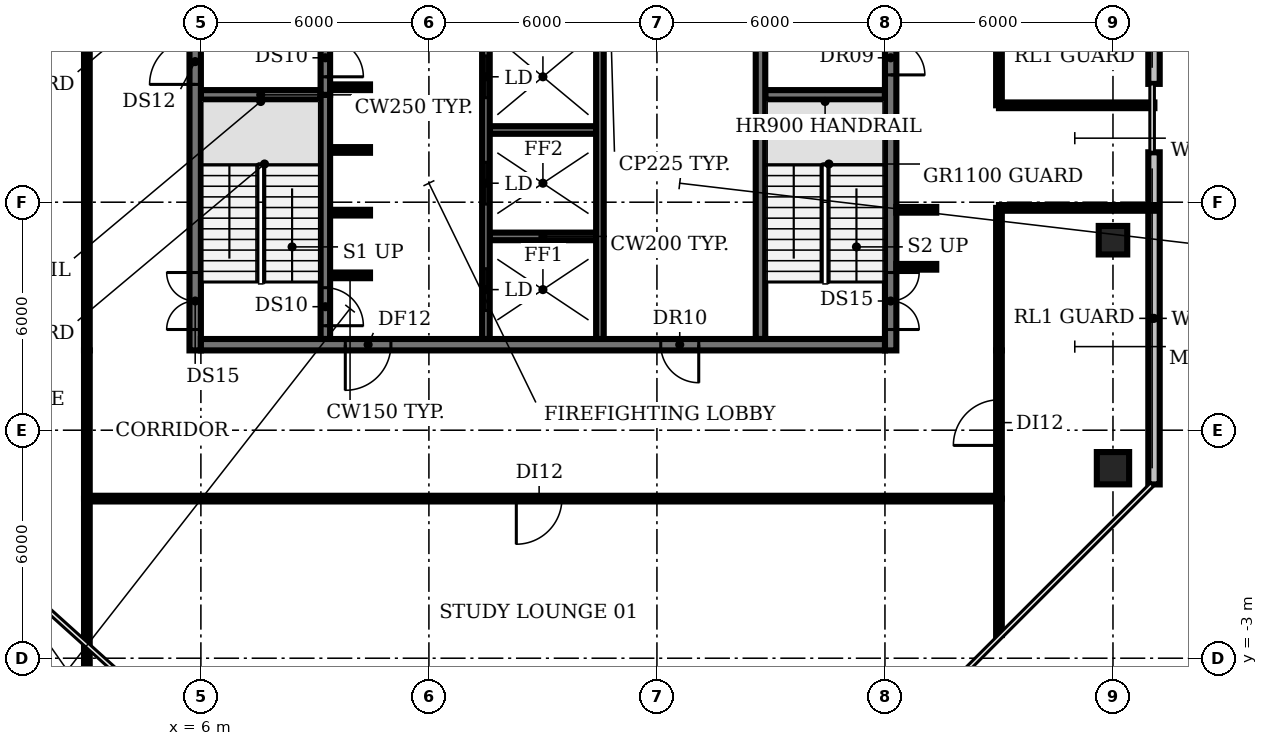
"""IFC4 building model, lengths in metres.
Left out: names, types, materials, properties, quantities, classifications, styles, units other than length and angle.
Written with IfcOpenShell. Run it as: python <this file> out.ifc"""

import sys

from ifc_helpers import new_model, si_unit, direction, frame, frame_2d, origin, origin_2d, place, context, subcontext, project, spatial, rectangle, circle, extrude, element, fill, save


model = new_model("IFC4")
c1 = context("Model", 3, precision=1e-05, world=origin(), true_north=direction((0.0, 1.0)))
c2 = subcontext(c1, "Body", "Model", "MODEL_VIEW")
j1 = project(units=[si_unit("LENGTHUNIT", "METRE"), si_unit("PLANEANGLEUNIT", "RADIAN")], contexts=[c1])
p1 = place(None, origin())
s1 = spatial("IfcSite", under=j1, at=p1, CompositionType="ELEMENT")
p2 = place(p1, origin())
s2 = spatial("IfcBuilding", under=s1, at=p2, CompositionType="ELEMENT")
p3 = place(p2, frame((0.0, 0.0, 268.4)))
s3 = spatial("IfcBuildingStorey", under=s2, at=p3, CompositionType="ELEMENT", Elevation=268.4)
p4 = place(p3, frame((30.0, 2.0, 0.0), z_axis=(0.0, 0.0, 1.0), x_axis=(1.0, 0.0, 0.0)))
e1 = element("IfcColumn", 1, at=p4, inside=s3, PredefinedType="COLUMN", context=c2, shape_type="SweptSolid", body=[
    extrude(circle(Radius=0.425, at=origin_2d()), origin(), (0.0, 0.0, 1.0), 3.8),
])
p5 = place(p3, frame((30.0, 8.0, 0.0), z_axis=(0.0, 0.0, 1.0), x_axis=(1.0, 0.0, 0.0)))
e2 = element("IfcColumn", 2, at=p5, inside=s3, PredefinedType="COLUMN", context=c2, shape_type="SweptSolid", body=[
    extrude(rectangle(XDim=0.75, YDim=0.75, at=origin_2d()), origin(), (0.0, 0.0, 1.0), 3.8),
])
p6 = place(p3, frame((31.08, 1.573, 0.0), z_axis=(0.0, 0.0, 1.0), x_axis=(0.0, 1.0, 0.0)))
e3 = element("IfcWall", 3, at=p6, inside=s3, PredefinedType="SOLIDWALL", context=c2, shape_type="SweptSolid", body=[
    extrude(rectangle(XDim=8.74, YDim=0.3, at=frame_2d((4.37, 0.0))), origin(), (0.0, 0.0, 1.0), 3.8),
])
p7 = place(p3, frame((31.08, 12.113, 0.0), z_axis=(0.0, 0.0, 1.0), x_axis=(0.0, 1.0, 0.0)))
e4 = element("IfcWall", 4, at=p7, inside=s3, PredefinedType="SOLIDWALL", context=c2, shape_type="SweptSolid", body=[
    extrude(rectangle(XDim=2.313, YDim=0.3, at=frame_2d((1.157, 0.0))), origin(), (0.0, 0.0, 1.0), 3.8),
])
p8 = place(p3, frame((9.4, 7.075, 0.0), z_axis=(0.0, 0.0, 1.0), x_axis=(1.0, 0.0, 0.0)))
e5 = element("IfcWall", 5, at=p8, inside=s3, PredefinedType="SHEAR", context=c2, shape_type="SweptSolid", body=[
    extrude(rectangle(XDim=1.05, YDim=0.15, at=frame_2d((0.525, 0.0))), origin(), (0.0, 0.0, 1.0), 3.8),
])
p9 = place(p3, frame((13.6, 8.1, 0.0), z_axis=(0.0, 0.0, 1.0), x_axis=(1.0, 0.0, 0.0)))
e6 = element("IfcWall", 6, at=p9, inside=s3, PredefinedType="SHEAR", context=c2, shape_type="SweptSolid", body=[
    extrude(rectangle(XDim=2.8, YDim=0.2, at=frame_2d((1.4, 0.0))), origin(), (0.0, 0.0, 1.0), 3.8),
])
for number, where, z_axis, x_axis in (
    (7, (9.4, 8.725, 0.0), (0.0, 0.0, 1.0), (1.0, 0.0, 0.0)),
    (8, (9.4, 10.375, 0.0), (0.0, 0.0, 1.0), (1.0, 0.0, 0.0)),
):
    element("IfcWall", number, at=place(p3, frame(where, z_axis=z_axis, x_axis=x_axis)), inside=s3, PredefinedType="SHEAR", context=c2, shape_type="SweptSolid", body=[
        extrude(rectangle(XDim=1.05, YDim=0.15, at=frame_2d((0.525, 0.0))), origin(), (0.0, 0.0, 1.0), 3.8),
    ])
p10 = place(p3, frame((13.6, 10.9, 0.0), z_axis=(0.0, 0.0, 1.0), x_axis=(1.0, 0.0, 0.0)))
e9 = element("IfcWall", 9, at=p10, inside=s3, PredefinedType="SHEAR", context=c2, shape_type="SweptSolid", body=[
    extrude(rectangle(XDim=2.8, YDim=0.2, at=frame_2d((1.4, 0.0))), origin(), (0.0, 0.0, 1.0), 3.8),
])
for number, where, z_axis, x_axis in (
    (10, (6.0, 11.825, 0.0), (0.0, 0.0, 1.0), (1.0, 0.0, 0.0)),
    (11, (20.85, 11.825, 0.0), (0.0, 0.0, 1.0), (1.0, 0.0, 0.0)),
):
    element("IfcWall", number, at=place(p3, frame(where, z_axis=z_axis, x_axis=x_axis)), inside=s3, PredefinedType="SHEAR", context=c2, shape_type="SweptSolid", body=[
        extrude(rectangle(XDim=3.15, YDim=0.25, at=frame_2d((1.575, 0.0))), origin(), (0.0, 0.0, 1.0), 3.8),
    ])
p11 = place(p3, frame((9.4, 12.025, 0.0), z_axis=(0.0, 0.0, 1.0), x_axis=(1.0, 0.0, 0.0)))
e12 = element("IfcWall", 12, at=p11, inside=s3, PredefinedType="SHEAR", context=c2, shape_type="SweptSolid", body=[
    extrude(rectangle(XDim=1.05, YDim=0.15, at=frame_2d((0.525, 0.0))), origin(), (0.0, 0.0, 1.0), 3.8),
])
p12 = place(p3, frame((9.275, 11.825, 0.0), z_axis=(0.0, 0.0, 1.0), x_axis=(0.0, -1.0, 0.0)))
e13 = element("IfcWall", 13, at=p12, inside=s3, PredefinedType="SHEAR", context=c2, shape_type="SweptSolid", body=[
    extrude(rectangle(XDim=6.425, YDim=0.25, at=frame_2d((3.212, 0.0))), origin(), (0.0, 0.0, 1.0), 3.8),
])
p13 = place(p12, frame((5.075, 0.0, 0.0)))
e14 = element("IfcOpeningElement", 14, at=p13, cuts=e13, PredefinedType="OPENING", context=c2, shape_type="SweptSolid", body=[
    extrude(rectangle(XDim=1.0, YDim=2.1, at=frame_2d((0.5, 1.05))), frame((0.0, 0.135, 0.0), z_axis=(0.0, -1.0, 0.0), x_axis=(1.0, 0.0, 0.0)), (0.0, 0.0, 1.0), 0.27),
])
p14 = place(p3, frame((9.275, 18.375, 0.0), z_axis=(0.0, 0.0, 1.0), x_axis=(0.0, -1.0, 0.0)))
e15 = element("IfcWall", 15, at=p14, inside=s3, PredefinedType="SHEAR", context=c2, shape_type="SweptSolid", body=[
    extrude(rectangle(XDim=6.55, YDim=0.25, at=frame_2d((3.275, 0.0))), origin(), (0.0, 0.0, 1.0), 3.8),
])
p15 = place(p14, frame((5.075, 0.0, 0.0)))
e16 = element("IfcOpeningElement", 16, at=p15, cuts=e15, PredefinedType="OPENING", context=c2, shape_type="SweptSolid", body=[
    extrude(rectangle(XDim=1.0, YDim=2.1, at=frame_2d((0.5, 1.05))), frame((0.0, 0.135, 0.0), z_axis=(0.0, -1.0, 0.0), x_axis=(1.0, 0.0, 0.0)), (0.0, 0.0, 1.0), 0.27),
])
p16 = place(p3, frame((13.5, 5.4, 0.0), z_axis=(0.0, 0.0, 1.0), x_axis=(0.0, 1.0, 0.0)))
e17 = element("IfcWall", 17, at=p16, inside=s3, PredefinedType="SHEAR", context=c2, shape_type="SweptSolid", body=[
    extrude(rectangle(XDim=8.2, YDim=0.2, at=frame_2d((4.1, 0.0))), origin(), (0.0, 0.0, 1.0), 3.8),
])
p17 = place(p16, frame((0.75, 0.0, 0.0)))
e18 = element("IfcOpeningElement", 18, at=p17, cuts=e17, PredefinedType="OPENING", context=c2, shape_type="SweptSolid", body=[
    extrude(rectangle(XDim=1.1, YDim=2.1, at=frame_2d((0.55, 1.05))), frame((0.0, 0.11, 0.0), z_axis=(0.0, -1.0, 0.0), x_axis=(1.0, 0.0, 0.0)), (0.0, 0.0, 1.0), 0.22),
])
p18 = place(p16, frame((3.55, 0.0, 0.0)))
e19 = element("IfcOpeningElement", 19, at=p18, cuts=e17, PredefinedType="OPENING", context=c2, shape_type="SweptSolid", body=[
    extrude(rectangle(XDim=1.1, YDim=2.1, at=frame_2d((0.55, 1.05))), frame((0.0, 0.11, 0.0), z_axis=(0.0, -1.0, 0.0), x_axis=(1.0, 0.0, 0.0)), (0.0, 0.0, 1.0), 0.22),
])
p19 = place(p16, frame((6.35, 0.0, 0.0)))
e20 = element("IfcOpeningElement", 20, at=p19, cuts=e17, PredefinedType="OPENING", context=c2, shape_type="SweptSolid", body=[
    extrude(rectangle(XDim=1.1, YDim=2.1, at=frame_2d((0.55, 1.05))), frame((0.0, 0.11, 0.0), z_axis=(0.0, -1.0, 0.0), x_axis=(1.0, 0.0, 0.0)), (0.0, 0.0, 1.0), 0.22),
])
p20 = place(p3, frame((16.5, 5.4, 0.0), z_axis=(0.0, 0.0, 1.0), x_axis=(0.0, 1.0, 0.0)))
e21 = element("IfcWall", 21, at=p20, inside=s3, PredefinedType="SHEAR", context=c2, shape_type="SweptSolid", body=[
    extrude(rectangle(XDim=8.2, YDim=0.2, at=frame_2d((4.1, 0.0))), origin(), (0.0, 0.0, 1.0), 3.8),
])
p21 = place(p3, frame((20.725, 5.4, 0.0), z_axis=(0.0, 0.0, 1.0), x_axis=(0.0, 1.0, 0.0)))
e22 = element("IfcWall", 22, at=p21, inside=s3, PredefinedType="SHEAR", context=c2, shape_type="SweptSolid", body=[
    extrude(rectangle(XDim=8.2, YDim=0.25, at=frame_2d((4.1, 0.0))), origin(), (0.0, 0.0, 1.0), 3.8),
])
p22 = place(p3, frame((5.85, 5.1, 0.0), z_axis=(0.0, 0.0, 1.0), x_axis=(0.0, 1.0, 0.0)))
e23 = element("IfcWall", 23, at=p22, inside=s3, PredefinedType="SHEAR", context=c2, shape_type="SweptSolid", body=[
    extrude(rectangle(XDim=20.0, YDim=0.3, at=frame_2d((10.0, 0.0))), origin(), (0.0, 0.0, 1.0), 3.8),
])
p23 = place(p22, frame((0.55, 0.0, 0.0)))
e24 = element("IfcOpeningElement", 24, at=p23, cuts=e23, PredefinedType="OPENING", context=c2, shape_type="SweptSolid", body=[
    extrude(rectangle(XDim=1.5, YDim=2.1, at=frame_2d((0.75, 1.05))), frame((0.0, 0.16, 0.0), z_axis=(0.0, -1.0, 0.0), x_axis=(1.0, 0.0, 0.0)), (0.0, 0.0, 1.0), 0.32),
])
p24 = place(p22, frame((7.0, 0.0, 0.0)))
e25 = element("IfcOpeningElement", 25, at=p24, cuts=e23, PredefinedType="OPENING", context=c2, shape_type="SweptSolid", body=[
    extrude(rectangle(XDim=1.2, YDim=2.1, at=frame_2d((0.6, 1.05))), frame((0.0, 0.16, 0.0), z_axis=(0.0, -1.0, 0.0), x_axis=(1.0, 0.0, 0.0)), (0.0, 0.0, 1.0), 0.32),
])
p25 = place(p22, frame((13.55, 0.0, 0.0)))
e26 = element("IfcOpeningElement", 26, at=p25, cuts=e23, PredefinedType="OPENING", context=c2, shape_type="SweptSolid", body=[
    extrude(rectangle(XDim=1.2, YDim=2.1, at=frame_2d((0.6, 1.05))), frame((0.0, 0.16, 0.0), z_axis=(0.0, -1.0, 0.0), x_axis=(1.0, 0.0, 0.0)), (0.0, 0.0, 1.0), 0.32),
])
p26 = place(p3, frame((24.15, 25.655, 0.0), z_axis=(0.0, 0.0, 1.0), x_axis=(0.0, -1.0, 0.0)))
e27 = element("IfcWall", 27, at=p26, inside=s3, PredefinedType="SHEAR", context=c2, shape_type="SweptSolid", body=[
    extrude(rectangle(XDim=20.555, YDim=0.3, at=frame_2d((10.277, 0.0))), origin(), (0.0, 0.0, 1.0), 3.8),
])
p27 = place(p26, frame((18.505, 0.0, 0.0)))
e28 = element("IfcOpeningElement", 28, at=p27, cuts=e27, PredefinedType="OPENING", context=c2, shape_type="SweptSolid", body=[
    extrude(rectangle(XDim=1.5, YDim=2.1, at=frame_2d((0.75, 1.05))), frame((0.0, 0.16, 0.0), z_axis=(0.0, -1.0, 0.0), x_axis=(1.0, 0.0, 0.0)), (0.0, 0.0, 1.0), 0.32),
])
p28 = place(p26, frame((12.405, 0.0, 0.0)))
e29 = element("IfcOpeningElement", 29, at=p28, cuts=e27, PredefinedType="OPENING", context=c2, shape_type="SweptSolid", body=[
    extrude(rectangle(XDim=0.9, YDim=2.1, at=frame_2d((0.45, 1.05))), frame((0.0, 0.16, 0.0), z_axis=(0.0, -1.0, 0.0), x_axis=(1.0, 0.0, 0.0)), (0.0, 0.0, 1.0), 0.32),
])
p29 = place(p26, frame((6.405, 0.0, 0.0)))
e30 = element("IfcOpeningElement", 30, at=p29, cuts=e27, PredefinedType="OPENING", context=c2, shape_type="SweptSolid", body=[
    extrude(rectangle(XDim=2.0, YDim=2.1, at=frame_2d((1.0, 1.05))), frame((0.0, 0.16, 0.0), z_axis=(0.0, -1.0, 0.0), x_axis=(1.0, 0.0, 0.0)), (0.0, 0.0, 1.0), 0.32),
])
p30 = place(p3, frame((24.0, 5.25, 0.0), z_axis=(0.0, 0.0, 1.0), x_axis=(-1.0, 0.0, 0.0)))
e31 = element("IfcWall", 31, at=p30, inside=s3, PredefinedType="SHEAR", context=c2, shape_type="SweptSolid", body=[
    extrude(rectangle(XDim=18.0, YDim=0.3, at=frame_2d((9.0, 0.0))), origin(), (0.0, 0.0, 1.0), 3.8),
])
p31 = place(p30, frame((13.0, 0.0, 0.0)))
e32 = element("IfcOpeningElement", 32, at=p31, cuts=e31, PredefinedType="OPENING", context=c2, shape_type="SweptSolid", body=[
    extrude(rectangle(XDim=1.2, YDim=2.1, at=frame_2d((0.6, 1.05))), frame((0.0, 0.16, 0.0), z_axis=(0.0, -1.0, 0.0), x_axis=(1.0, 0.0, 0.0)), (0.0, 0.0, 1.0), 0.32),
])
p32 = place(p30, frame((4.9, 0.0, 0.0)))
e33 = element("IfcOpeningElement", 33, at=p32, cuts=e31, PredefinedType="OPENING", context=c2, shape_type="SweptSolid", body=[
    extrude(rectangle(XDim=1.0, YDim=2.1, at=frame_2d((0.5, 1.05))), frame((0.0, 0.16, 0.0), z_axis=(0.0, -1.0, 0.0), x_axis=(1.0, 0.0, 0.0)), (0.0, 0.0, 1.0), 0.32),
])
p33 = place(p3, frame((3.0, -4.22, 0.0), z_axis=(0.0, 0.0, 1.0), x_axis=(0.0, 1.0, 0.0)))
e34 = element("IfcWall", 34, at=p33, inside=s3, PredefinedType="PARTITIONING", context=c2, shape_type="SweptSolid", body=[
    extrude(rectangle(XDim=5.42, YDim=0.15, at=frame_2d((2.71, 0.0))), origin(), (0.0, 0.0, 1.0), 2.85),
])
p34 = place(p3, frame((3.0, 1.2, 0.0), z_axis=(0.0, 0.0, 1.0), x_axis=(0.0, 1.0, 0.0)))
e35 = element("IfcWall", 35, at=p34, inside=s3, PredefinedType="PARTITIONING", context=c2, shape_type="SweptSolid", body=[
    extrude(rectangle(XDim=3.9, YDim=0.15, at=frame_2d((1.95, 0.0))), origin(), (0.0, 0.0, 1.0), 2.85),
])
p35 = place(p3, frame((3.0, 5.1, 0.0), z_axis=(0.0, 0.0, 1.0), x_axis=(0.0, 1.0, 0.0)))
e36 = element("IfcWall", 36, at=p35, inside=s3, PredefinedType="PARTITIONING", context=c2, shape_type="SweptSolid", body=[
    extrude(rectangle(XDim=20.0, YDim=0.15, at=frame_2d((10.0, 0.0))), origin(), (0.0, 0.0, 1.0), 2.85),
])
p36 = place(p35, frame((9.3, 0.0, 0.0)))
e37 = element("IfcOpeningElement", 37, at=p36, cuts=e36, PredefinedType="OPENING", context=c2, shape_type="SweptSolid", body=[
    extrude(rectangle(XDim=1.2, YDim=2.1, at=frame_2d((0.6, 1.05))), frame((0.0, 0.085, 0.0), z_axis=(0.0, -1.0, 0.0), x_axis=(1.0, 0.0, 0.0)), (0.0, 0.0, 1.0), 0.17),
])
for number, where, z_axis, x_axis in (
    (38, (24.3, 7.3, 0.0), (0.0, 0.0, 1.0), (1.0, 0.0, 0.0)),
    (39, (24.3, 8.8, 0.0), (0.0, 0.0, 1.0), (1.0, 0.0, 0.0)),
):
    element("IfcWall", number, at=place(p3, frame(where, z_axis=z_axis, x_axis=x_axis)), inside=s3, PredefinedType="PARTITIONING", context=c2, shape_type="SweptSolid", body=[
        extrude(rectangle(XDim=1.05, YDim=0.15, at=frame_2d((0.525, 0.0))), origin(), (0.0, 0.0, 1.0), 2.85),
    ])
p37 = place(p3, frame((27.0, -2.39, 0.0), z_axis=(0.0, 0.0, 1.0), x_axis=(0.0, 1.0, 0.0)))
e40 = element("IfcWall", 40, at=p37, inside=s3, PredefinedType="PARTITIONING", context=c2, shape_type="SweptSolid", body=[
    extrude(rectangle(XDim=3.59, YDim=0.15, at=frame_2d((1.795, 0.0))), origin(), (0.0, 0.0, 1.0), 2.85),
])
p38 = place(p3, frame((27.0, 1.2, 0.0), z_axis=(0.0, 0.0, 1.0), x_axis=(-1.0, 0.0, 0.0)))
e41 = element("IfcWall", 41, at=p38, inside=s3, PredefinedType="PARTITIONING", context=c2, shape_type="SweptSolid", body=[
    extrude(rectangle(XDim=24.0, YDim=0.15, at=frame_2d((12.0, 0.0))), origin(), (0.0, 0.0, 1.0), 2.85),
])
p39 = place(p38, frame((11.5, 0.0, 0.0)))
e42 = element("IfcOpeningElement", 42, at=p39, cuts=e41, PredefinedType="OPENING", context=c2, shape_type="SweptSolid", body=[
    extrude(rectangle(XDim=1.2, YDim=2.1, at=frame_2d((0.6, 1.05))), frame((0.0, 0.085, 0.0), z_axis=(0.0, -1.0, 0.0), x_axis=(1.0, 0.0, 0.0)), (0.0, 0.0, 1.0), 0.17),
])
p40 = place(p3, frame((27.0, 1.2, 0.0), z_axis=(0.0, 0.0, 1.0), x_axis=(0.0, 1.0, 0.0)))
e43 = element("IfcWall", 43, at=p40, inside=s3, PredefinedType="PARTITIONING", context=c2, shape_type="SweptSolid", body=[
    extrude(rectangle(XDim=3.9, YDim=0.15, at=frame_2d((1.95, 0.0))), origin(), (0.0, 0.0, 1.0), 2.85),
])
p41 = place(p40, frame((1.4, 0.0, 0.0)))
e44 = element("IfcOpeningElement", 44, at=p41, cuts=e43, PredefinedType="OPENING", context=c2, shape_type="SweptSolid", body=[
    extrude(rectangle(XDim=1.2, YDim=2.1, at=frame_2d((0.6, 1.05))), frame((0.0, 0.085, 0.0), z_axis=(0.0, -1.0, 0.0), x_axis=(1.0, 0.0, 0.0)), (0.0, 0.0, 1.0), 0.17),
])
p42 = place(p3, frame((27.0, 5.1, 0.0), z_axis=(0.0, 0.0, 1.0), x_axis=(0.0, 1.0, 0.0)))
e45 = element("IfcWall", 45, at=p42, inside=s3, PredefinedType="PARTITIONING", context=c2, shape_type="SweptSolid", body=[
    extrude(rectangle(XDim=3.75, YDim=0.15, at=frame_2d((1.875, 0.0))), origin(), (0.0, 0.0, 1.0), 2.85),
])
p43 = place(p3, frame((27.0, 8.85, 0.0), z_axis=(0.0, 0.0, 1.0), x_axis=(1.0, 0.0, 0.0)))
e46 = element("IfcWall", 46, at=p43, inside=s3, PredefinedType="PARTITIONING", context=c2, shape_type="SweptSolid", body=[
    extrude(rectangle(XDim=4.09, YDim=0.15, at=frame_2d((2.045, 0.0))), origin(), (0.0, 0.0, 1.0), 2.85),
])
p44 = place(p3, frame((27.0, 11.55, 0.0), z_axis=(0.0, 0.0, 1.0), x_axis=(0.0, 1.0, 0.0)))
e47 = element("IfcWall", 47, at=p44, inside=s3, PredefinedType="PARTITIONING", context=c2, shape_type="SweptSolid", body=[
    extrude(rectangle(XDim=6.83, YDim=0.15, at=frame_2d((3.415, 0.0))), origin(), (0.0, 0.0, 1.0), 2.85),
])
p45 = place(p44, frame((2.9, 0.0, 0.0)))
e48 = element("IfcOpeningElement", 48, at=p45, cuts=e47, PredefinedType="OPENING", context=c2, shape_type="SweptSolid", body=[
    extrude(rectangle(XDim=1.2, YDim=2.1, at=frame_2d((0.6, 1.05))), frame((0.0, 0.085, 0.0), z_axis=(0.0, -1.0, 0.0), x_axis=(1.0, 0.0, 0.0)), (0.0, 0.0, 1.0), 0.17),
])
p46 = place(p3, frame((27.0, 11.55, 0.0), z_axis=(0.0, 0.0, 1.0), x_axis=(1.0, 0.0, 0.0)))
e49 = element("IfcWall", 49, at=p46, inside=s3, PredefinedType="PARTITIONING", context=c2, shape_type="SweptSolid", body=[
    extrude(rectangle(XDim=4.09, YDim=0.15, at=frame_2d((2.045, 0.0))), origin(), (0.0, 0.0, 1.0), 2.85),
])
p47 = place(p13, origin())
e50 = element("IfcDoor", 50, at=p47, inside=s3, OperationType="SINGLE_SWING_RIGHT", PredefinedType="DOOR", context=c2, shape_type="SweptSolid", body=[
    extrude(rectangle(XDim=1.0, YDim=2.1, at=frame_2d((0.5, 1.05))), frame((0.0, 0.025, 0.0), z_axis=(0.0, -1.0, 0.0), x_axis=(1.0, 0.0, 0.0)), (0.0, 0.0, 1.0), 0.05),
])
fill(e14, e50)
p48 = place(p15, origin())
e51 = element("IfcDoor", 51, at=p48, inside=s3, OperationType="SINGLE_SWING_RIGHT", PredefinedType="DOOR", context=c2, shape_type="SweptSolid", body=[
    extrude(rectangle(XDim=1.0, YDim=2.1, at=frame_2d((0.5, 1.05))), frame((0.0, 0.025, 0.0), z_axis=(0.0, -1.0, 0.0), x_axis=(1.0, 0.0, 0.0)), (0.0, 0.0, 1.0), 0.05),
])
fill(e16, e51)
p49 = place(p17, origin())
e52 = element("IfcDoor", 52, at=p49, inside=s3, OperationType="DOUBLE_DOOR_SLIDING", PredefinedType="DOOR", context=c2, shape_type="SweptSolid", body=[
    extrude(rectangle(XDim=1.1, YDim=2.1, at=frame_2d((0.55, 1.05))), frame((0.0, 0.025, 0.0), z_axis=(0.0, -1.0, 0.0), x_axis=(1.0, 0.0, 0.0)), (0.0, 0.0, 1.0), 0.05),
])
fill(e18, e52)
p50 = place(p18, origin())
e53 = element("IfcDoor", 53, at=p50, inside=s3, OperationType="DOUBLE_DOOR_SLIDING", PredefinedType="DOOR", context=c2, shape_type="SweptSolid", body=[
    extrude(rectangle(XDim=1.1, YDim=2.1, at=frame_2d((0.55, 1.05))), frame((0.0, 0.025, 0.0), z_axis=(0.0, -1.0, 0.0), x_axis=(1.0, 0.0, 0.0)), (0.0, 0.0, 1.0), 0.05),
])
fill(e19, e53)
p51 = place(p19, origin())
e54 = element("IfcDoor", 54, at=p51, inside=s3, OperationType="DOUBLE_DOOR_SLIDING", PredefinedType="DOOR", context=c2, shape_type="SweptSolid", body=[
    extrude(rectangle(XDim=1.1, YDim=2.1, at=frame_2d((0.55, 1.05))), frame((0.0, 0.025, 0.0), z_axis=(0.0, -1.0, 0.0), x_axis=(1.0, 0.0, 0.0)), (0.0, 0.0, 1.0), 0.05),
])
fill(e20, e54)
p52 = place(p23, origin())
e55 = element("IfcDoor", 55, at=p52, inside=s3, OperationType="DOUBLE_DOOR_SINGLE_SWING", PredefinedType="DOOR", context=c2, shape_type="SweptSolid", body=[
    extrude(rectangle(XDim=1.5, YDim=2.1, at=frame_2d((0.75, 1.05))), frame((0.0, 0.025, 0.0), z_axis=(0.0, -1.0, 0.0), x_axis=(1.0, 0.0, 0.0)), (0.0, 0.0, 1.0), 0.05),
])
fill(e24, e55)
p53 = place(p24, origin())
e56 = element("IfcDoor", 56, at=p53, inside=s3, OperationType="SINGLE_SWING_LEFT", PredefinedType="DOOR", context=c2, shape_type="SweptSolid", body=[
    extrude(rectangle(XDim=1.2, YDim=2.1, at=frame_2d((0.6, 1.05))), frame((0.0, 0.025, 0.0), z_axis=(0.0, -1.0, 0.0), x_axis=(1.0, 0.0, 0.0)), (0.0, 0.0, 1.0), 0.05),
])
fill(e25, e56)
p54 = place(p27, origin())
e57 = element("IfcDoor", 57, at=p54, inside=s3, OperationType="DOUBLE_DOOR_SINGLE_SWING", PredefinedType="DOOR", context=c2, shape_type="SweptSolid", body=[
    extrude(rectangle(XDim=1.5, YDim=2.1, at=frame_2d((0.75, 1.05))), frame((0.0, 0.025, 0.0), z_axis=(0.0, -1.0, 0.0), x_axis=(1.0, 0.0, 0.0)), (0.0, 0.0, 1.0), 0.05),
])
fill(e28, e57)
p55 = place(p28, origin())
e58 = element("IfcDoor", 58, at=p55, inside=s3, OperationType="SINGLE_SWING_RIGHT", PredefinedType="DOOR", context=c2, shape_type="SweptSolid", body=[
    extrude(rectangle(XDim=0.9, YDim=2.1, at=frame_2d((0.45, 1.05))), frame((0.0, 0.025, 0.0), z_axis=(0.0, -1.0, 0.0), x_axis=(1.0, 0.0, 0.0)), (0.0, 0.0, 1.0), 0.05),
])
fill(e29, e58)
p56 = place(p31, origin())
e59 = element("IfcDoor", 59, at=p56, inside=s3, OperationType="SINGLE_SWING_RIGHT", PredefinedType="DOOR", context=c2, shape_type="SweptSolid", body=[
    extrude(rectangle(XDim=1.2, YDim=2.1, at=frame_2d((0.6, 1.05))), frame((0.0, 0.025, 0.0), z_axis=(0.0, -1.0, 0.0), x_axis=(1.0, 0.0, 0.0)), (0.0, 0.0, 1.0), 0.05),
])
fill(e32, e59)
p57 = place(p32, origin())
e60 = element("IfcDoor", 60, at=p57, inside=s3, OperationType="SINGLE_SWING_LEFT", PredefinedType="DOOR", context=c2, shape_type="SweptSolid", body=[
    extrude(rectangle(XDim=1.0, YDim=2.1, at=frame_2d((0.5, 1.05))), frame((0.0, 0.025, 0.0), z_axis=(0.0, -1.0, 0.0), x_axis=(1.0, 0.0, 0.0)), (0.0, 0.0, 1.0), 0.05),
])
fill(e33, e60)
p58 = place(p39, origin())
e61 = element("IfcDoor", 61, at=p58, inside=s3, OperationType="SINGLE_SWING_RIGHT", PredefinedType="DOOR", context=c2, shape_type="SweptSolid", body=[
    extrude(rectangle(XDim=1.2, YDim=2.1, at=frame_2d((0.6, 1.05))), frame((0.0, 0.025, 0.0), z_axis=(0.0, -1.0, 0.0), x_axis=(1.0, 0.0, 0.0)), (0.0, 0.0, 1.0), 0.05),
])
fill(e42, e61)
p59 = place(p41, origin())
e62 = element("IfcDoor", 62, at=p59, inside=s3, OperationType="SINGLE_SWING_LEFT", PredefinedType="DOOR", context=c2, shape_type="SweptSolid", body=[
    extrude(rectangle(XDim=1.2, YDim=2.1, at=frame_2d((0.6, 1.05))), frame((0.0, 0.025, 0.0), z_axis=(0.0, -1.0, 0.0), x_axis=(1.0, 0.0, 0.0)), (0.0, 0.0, 1.0), 0.05),
])
fill(e44, e62)
save(model, sys.argv[1])
